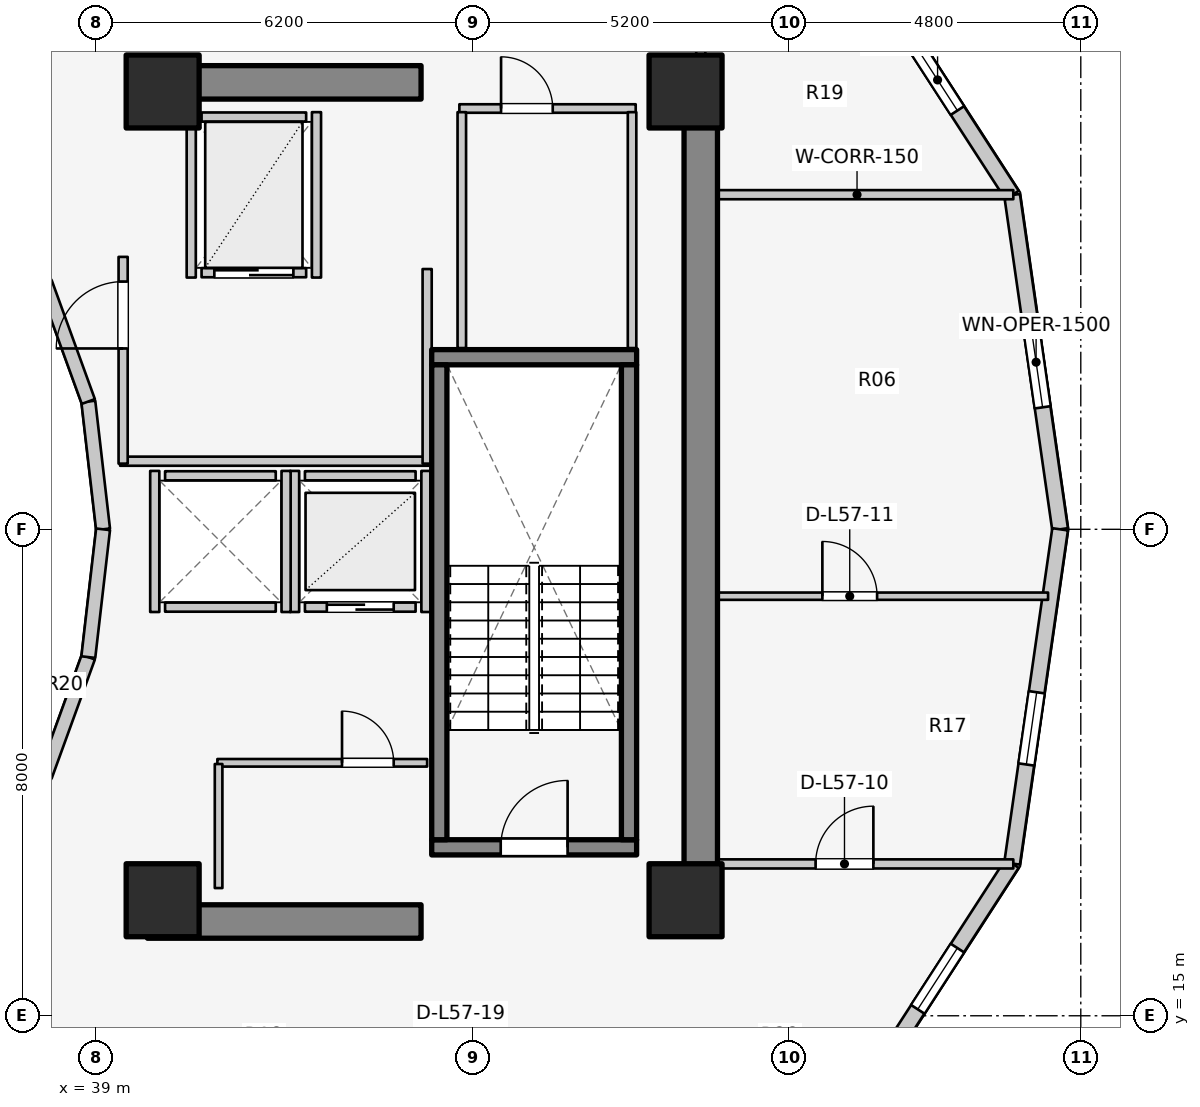
"""IFC4 building model, lengths in metres.
Left out: names, types, materials, properties, quantities, classifications, styles, units other than length and angle.
Written with IfcOpenShell. Run it as: python <this file> out.ifc"""

import sys

from ifc_helpers import new_model, si_unit, direction, frame, frame_2d, origin, origin_2d, place, context, subcontext, project, spatial, rectangle, extrude, element, fill, save


model = new_model("IFC4")
c1 = context("Model", 3, precision=1e-05, world=origin(), true_north=direction((0.0, 1.0)))
c2 = subcontext(c1, "Body", "Model", "MODEL_VIEW")
j1 = project(units=[si_unit("LENGTHUNIT", "METRE"), si_unit("PLANEANGLEUNIT", "RADIAN")], contexts=[c1])
p1 = place(None, origin())
s1 = spatial("IfcSite", under=j1, at=p1, CompositionType="ELEMENT")
p2 = place(p1, origin())
s2 = spatial("IfcBuilding", under=s1, at=p2, CompositionType="ELEMENT")
p3 = place(p2, frame((0.0, 0.0, 187.0)))
s3 = spatial("IfcBuildingStorey", under=s2, at=p3, CompositionType="ELEMENT", Elevation=187.0)
p4 = place(p3, frame((48.95, 17.05, 0.0), z_axis=(0.0, 0.0, 1.0), x_axis=(0.0, 1.0, 0.0)))
e1 = element("IfcWall", 1, at=p4, inside=s3, PredefinedType="SHEAR", context=c2, shape_type="SweptSolid", body=[
    extrude(rectangle(XDim=12.8, YDim=0.55, at=frame_2d((6.4, 0.0))), origin(), (0.0, 0.0, 1.0), 3.1),
])
for number, where, z_axis, x_axis in (
    (2, (39.85, 16.55, 0.0), (0.0, 0.0, 1.0), (1.0, 0.0, 0.0)),
    (3, (39.85, 30.35, 0.0), (0.0, 0.0, 1.0), (1.0, 0.0, 0.0)),
):
    element("IfcWall", number, at=place(p3, frame(where, z_axis=z_axis, x_axis=x_axis)), inside=s3, PredefinedType="SHEAR", context=c2, shape_type="SweptSolid", body=[
        extrude(rectangle(XDim=4.5, YDim=0.55, at=frame_2d((2.25, 0.0))), origin(), (0.0, 0.0, 1.0), 3.1),
    ])
p5 = place(p3, frame((44.525, 17.77, 0.0), z_axis=(0.0, 0.0, 1.0), x_axis=(1.0, 0.0, 0.0)))
e4 = element("IfcWall", 4, at=p5, inside=s3, PredefinedType="SOLIDWALL", context=c2, shape_type="SweptSolid", body=[
    extrude(rectangle(XDim=3.37, YDim=0.25, at=frame_2d((1.685, 0.0))), origin(), (0.0, 0.0, 1.0), 3.1),
])
p6 = place(p5, frame((1.135, 0.0, 0.0)))
e5 = element("IfcOpeningElement", 5, at=p6, cuts=e4, PredefinedType="OPENING", context=c2, shape_type="SweptSolid", body=[
    extrude(rectangle(XDim=1.1, YDim=2.1, at=frame_2d((0.55, 1.05))), frame((0.0, 0.135, 0.0), z_axis=(0.0, -1.0, 0.0), x_axis=(1.0, 0.0, 0.0)), (0.0, 0.0, 1.0), 0.27),
])
p7 = place(p3, frame((44.525, 25.83, 0.0), z_axis=(0.0, 0.0, 1.0), x_axis=(1.0, 0.0, 0.0)))
e6 = element("IfcWall", 6, at=p7, inside=s3, PredefinedType="SOLIDWALL", context=c2, shape_type="SweptSolid", body=[
    extrude(rectangle(XDim=3.37, YDim=0.25, at=frame_2d((1.685, 0.0))), origin(), (0.0, 0.0, 1.0), 3.1),
])
for number, where, z_axis, x_axis in (
    (7, (44.65, 17.895, 0.0), (0.0, 0.0, 1.0), (0.0, 1.0, 0.0)),
    (8, (47.77, 17.895, 0.0), (0.0, 0.0, 1.0), (0.0, 1.0, 0.0)),
):
    element("IfcWall", number, at=place(p3, frame(where, z_axis=z_axis, x_axis=x_axis)), inside=s3, PredefinedType="SOLIDWALL", context=c2, shape_type="SweptSolid", body=[
        extrude(rectangle(XDim=7.81, YDim=0.25, at=frame_2d((3.905, 0.0))), origin(), (0.0, 0.0, 1.0), 3.1),
    ])
for number, where, z_axis, x_axis in (
    (9, (40.1, 16.9, 0.0), (0.0, 0.0, 1.0), (1.0, 0.0, 0.0)),
    (10, (48.7, 16.9, 0.0), (0.0, 0.0, 1.0), (1.0, 0.0, 0.0)),
    (11, (48.7, 30.2, 0.0), (0.0, 0.0, 1.0), (1.0, 0.0, 0.0)),
    (12, (40.1, 30.2, 0.0), (0.0, 0.0, 1.0), (1.0, 0.0, 0.0)),
):
    element("IfcColumn", number, at=place(p3, frame(where, z_axis=z_axis, x_axis=x_axis)), inside=s3, PredefinedType="COLUMN", context=c2, shape_type="SweptSolid", body=[
        extrude(rectangle(XDim=1.2, YDim=1.2, at=origin_2d()), origin(), (0.0, 0.0, 1.0), 3.1),
    ])
p8 = place(p3, frame((39.12, 23.0, 0.0), z_axis=(0.0, 0.0, 1.0), x_axis=(-0.114711713601, 0.993398823617, 0.0)))
e13 = element("IfcWall", 13, at=p8, inside=s3, PredefinedType="STANDARD", context=c2, shape_type="SweptSolid", body=[
    extrude(rectangle(XDim=2.115, YDim=0.23, at=frame_2d((1.058, 0.0))), origin(), (0.0, 0.0, 1.0), 2.56),
])
for number, where, z_axis, x_axis in (
    (14, (38.877, 25.102, 0.0), (0.0, 0.0, 1.0), (-0.341, 0.94, 0.0)),
    (15, (38.166, 18.94, 0.0), (0.0, 0.0, 1.0), (0.341, 0.94, 0.0)),
):
    element("IfcWall", number, at=place(p3, frame(where, z_axis=z_axis, x_axis=x_axis)), inside=s3, PredefinedType="STANDARD", context=c2, shape_type="SweptSolid", body=[
        extrude(rectangle(XDim=2.084, YDim=0.23, at=frame_2d((1.042, 0.0))), origin(), (0.0, 0.0, 1.0), 2.56),
    ])
p9 = place(p3, frame((38.877, 20.898, 0.0), z_axis=(0.0, 0.0, 1.0), x_axis=(0.114711713601, 0.993398823617, 0.0)))
e16 = element("IfcWall", 16, at=p9, inside=s3, PredefinedType="STANDARD", context=c2, shape_type="SweptSolid", body=[
    extrude(rectangle(XDim=2.115, YDim=0.23, at=frame_2d((1.058, 0.0))), origin(), (0.0, 0.0, 1.0), 2.56),
])
p10 = place(p3, frame((54.86, 23.0, 0.0), z_axis=(0.0, 0.0, 1.0), x_axis=(-0.142227632286, 0.989833976288, 0.0)))
e17 = element("IfcWall", 17, at=p10, inside=s3, PredefinedType="STANDARD", context=c2, shape_type="SweptSolid", body=[
    extrude(rectangle(XDim=5.553, YDim=0.26, at=frame_2d((2.776, 0.0))), origin(), (0.0, 0.0, 1.0), 2.57),
])
p11 = place(p10, frame((2.027, 0.0, 0.75)))
e18 = element("IfcOpeningElement", 18, at=p11, cuts=e17, PredefinedType="OPENING", context=c2, shape_type="SweptSolid", body=[
    extrude(rectangle(XDim=1.5, YDim=1.6, at=frame_2d((0.75, 0.8))), frame((0.0, 0.14, 0.0), z_axis=(0.0, -1.0, 0.0), x_axis=(1.0, 0.0, 0.0)), (0.0, 0.0, 1.0), 0.28),
])
p12 = place(p3, frame((54.07, 28.497, 0.0), z_axis=(0.0, 0.0, 1.0), x_axis=(-0.543358984534, 0.839500454989, 0.0)))
e19 = element("IfcWall", 19, at=p12, inside=s3, PredefinedType="STANDARD", context=c2, shape_type="SweptSolid", body=[
    extrude(rectangle(XDim=4.511, YDim=0.26, at=frame_2d((2.256, 0.0))), origin(), (0.0, 0.0, 1.0), 1.22),
])
p13 = place(p12, frame((1.656, 0.0, 0.15)))
e20 = element("IfcOpeningElement", 20, at=p13, cuts=e19, PredefinedType="OPENING", context=c2, shape_type="SweptSolid", body=[
    extrude(rectangle(XDim=1.2, YDim=0.9, at=frame_2d((0.6, 0.45))), frame((0.0, 0.14, 0.0), z_axis=(0.0, -1.0, 0.0), x_axis=(1.0, 0.0, 0.0)), (0.0, 0.0, 1.0), 0.28),
])
p14 = place(p3, frame((51.619, 13.716, 0.0), z_axis=(0.0, 0.0, 1.0), x_axis=(0.543358984534, 0.839500454989, 0.0)))
e21 = element("IfcWall", 21, at=p14, inside=s3, PredefinedType="STANDARD", context=c2, shape_type="SweptSolid", body=[
    extrude(rectangle(XDim=4.511, YDim=0.26, at=frame_2d((2.256, 0.0))), origin(), (0.0, 0.0, 1.0), 1.22),
])
p15 = place(p14, frame((1.656, 0.0, 0.15)))
e22 = element("IfcOpeningElement", 22, at=p15, cuts=e21, PredefinedType="OPENING", context=c2, shape_type="SweptSolid", body=[
    extrude(rectangle(XDim=1.2, YDim=0.9, at=frame_2d((0.6, 0.45))), frame((0.0, 0.14, 0.0), z_axis=(0.0, -1.0, 0.0), x_axis=(1.0, 0.0, 0.0)), (0.0, 0.0, 1.0), 0.28),
])
p16 = place(p3, frame((54.07, 17.503, 0.0), z_axis=(0.0, 0.0, 1.0), x_axis=(0.142227632286, 0.989833976288, 0.0)))
e23 = element("IfcWall", 23, at=p16, inside=s3, PredefinedType="STANDARD", context=c2, shape_type="SweptSolid", body=[
    extrude(rectangle(XDim=5.553, YDim=0.26, at=frame_2d((2.776, 0.0))), origin(), (0.0, 0.0, 1.0), 2.57),
])
p17 = place(p16, frame((1.646, 0.0, 0.75)))
e24 = element("IfcOpeningElement", 24, at=p17, cuts=e23, PredefinedType="OPENING", context=c2, shape_type="SweptSolid", body=[
    extrude(rectangle(XDim=1.2, YDim=1.5, at=frame_2d((0.6, 0.75))), frame((0.0, 0.14, 0.0), z_axis=(0.0, -1.0, 0.0), x_axis=(1.0, 0.0, 0.0)), (0.0, 0.0, 1.0), 0.28),
])
p18 = place(p3, frame((42.44, 21.72, 0.0), z_axis=(0.0, 0.0, 1.0), x_axis=(1.0, 0.0, 0.0)))
e25 = element("IfcWall", 25, at=p18, inside=s3, PredefinedType="SOLIDWALL", context=c2, shape_type="SweptSolid", body=[
    extrude(rectangle(XDim=1.82, YDim=0.15, at=frame_2d((0.91, 0.0))), origin(), (0.0, 0.0, 1.0), 2.575),
])
p19 = place(p18, frame((0.36, 0.0, 0.0)))
e26 = element("IfcOpeningElement", 26, at=p19, cuts=e25, PredefinedType="OPENING", context=c2, shape_type="SweptSolid", body=[
    extrude(rectangle(XDim=1.1, YDim=2.1, at=frame_2d((0.55, 1.05))), frame((0.0, 0.085, 0.0), z_axis=(0.0, -1.0, 0.0), x_axis=(1.0, 0.0, 0.0)), (0.0, 0.0, 1.0), 0.17),
])
p20 = place(p3, frame((42.44, 23.88, 0.0), z_axis=(0.0, 0.0, 1.0), x_axis=(1.0, 0.0, 0.0)))
e27 = element("IfcWall", 27, at=p20, inside=s3, PredefinedType="SOLIDWALL", context=c2, shape_type="SweptSolid", body=[
    extrude(rectangle(XDim=1.82, YDim=0.15, at=frame_2d((0.91, 0.0))), origin(), (0.0, 0.0, 1.0), 2.575),
])
for number, where, z_axis, x_axis in (
    (28, (42.27, 21.64, 0.0), (0.0, 0.0, 1.0), (0.0, 1.0, 0.0)),
    (29, (44.43, 21.64, 0.0), (0.0, 0.0, 1.0), (0.0, 1.0, 0.0)),
):
    element("IfcWall", number, at=place(p3, frame(where, z_axis=z_axis, x_axis=x_axis)), inside=s3, PredefinedType="SOLIDWALL", context=c2, shape_type="SweptSolid", body=[
        extrude(rectangle(XDim=2.32, YDim=0.15, at=frame_2d((1.16, 0.0))), origin(), (0.0, 0.0, 1.0), 2.575),
    ])
for number, where, z_axis, x_axis in (
    (30, (40.14, 21.72, 0.0), (0.0, 0.0, 1.0), (1.0, 0.0, 0.0)),
    (31, (40.14, 23.88, 0.0), (0.0, 0.0, 1.0), (1.0, 0.0, 0.0)),
):
    element("IfcWall", number, at=place(p3, frame(where, z_axis=z_axis, x_axis=x_axis)), inside=s3, PredefinedType="SOLIDWALL", context=c2, shape_type="SweptSolid", body=[
        extrude(rectangle(XDim=1.82, YDim=0.15, at=frame_2d((0.91, 0.0))), origin(), (0.0, 0.0, 1.0), 2.12),
    ])
p21 = place(p3, frame((39.97, 21.64, 0.0), z_axis=(0.0, 0.0, 1.0), x_axis=(0.0, 1.0, 0.0)))
e32 = element("IfcWall", 32, at=p21, inside=s3, PredefinedType="SOLIDWALL", context=c2, shape_type="SweptSolid", body=[
    extrude(rectangle(XDim=2.32, YDim=0.15, at=frame_2d((1.16, 0.0))), origin(), (0.0, 0.0, 1.0), 2.12),
])
p22 = place(p3, frame((42.13, 21.64, 0.0), z_axis=(0.0, 0.0, 1.0), x_axis=(0.0, 1.0, 0.0)))
e33 = element("IfcWall", 33, at=p22, inside=s3, PredefinedType="SOLIDWALL", context=c2, shape_type="SweptSolid", body=[
    extrude(rectangle(XDim=2.32, YDim=0.15, at=frame_2d((1.16, 0.0))), origin(), (0.0, 0.0, 1.0), 2.575),
])
p23 = place(p3, frame((40.74, 27.22, 0.0), z_axis=(0.0, 0.0, 1.0), x_axis=(1.0, 0.0, 0.0)))
e34 = element("IfcWall", 34, at=p23, inside=s3, PredefinedType="SOLIDWALL", context=c2, shape_type="SweptSolid", body=[
    extrude(rectangle(XDim=1.72, YDim=0.15, at=frame_2d((0.86, 0.0))), origin(), (0.0, 0.0, 1.0), 2.575),
])
p24 = place(p23, frame((0.21, 0.0, 0.0)))
e35 = element("IfcOpeningElement", 35, at=p24, cuts=e34, PredefinedType="OPENING", context=c2, shape_type="SweptSolid", body=[
    extrude(rectangle(XDim=1.3, YDim=2.1, at=frame_2d((0.65, 1.05))), frame((0.0, 0.085, 0.0), z_axis=(0.0, -1.0, 0.0), x_axis=(1.0, 0.0, 0.0)), (0.0, 0.0, 1.0), 0.17),
])
p25 = place(p3, frame((40.74, 29.78, 0.0), z_axis=(0.0, 0.0, 1.0), x_axis=(1.0, 0.0, 0.0)))
e36 = element("IfcWall", 36, at=p25, inside=s3, PredefinedType="SOLIDWALL", context=c2, shape_type="SweptSolid", body=[
    extrude(rectangle(XDim=1.72, YDim=0.15, at=frame_2d((0.86, 0.0))), origin(), (0.0, 0.0, 1.0), 2.575),
])
for number, where, z_axis, x_axis in (
    (37, (40.57, 27.14, 0.0), (0.0, 0.0, 1.0), (0.0, 1.0, 0.0)),
    (38, (42.63, 27.14, 0.0), (0.0, 0.0, 1.0), (0.0, 1.0, 0.0)),
):
    element("IfcWall", number, at=place(p3, frame(where, z_axis=z_axis, x_axis=x_axis)), inside=s3, PredefinedType="SOLIDWALL", context=c2, shape_type="SweptSolid", body=[
        extrude(rectangle(XDim=2.72, YDim=0.15, at=frame_2d((1.36, 0.0))), origin(), (0.0, 0.0, 1.0), 2.575),
    ])
p26 = place(p3, frame((39.4, 24.12, 0.0), z_axis=(0.0, 0.0, 1.0), x_axis=(1.0, 0.0, 0.0)))
e39 = element("IfcWall", 39, at=p26, inside=s3, PredefinedType="PARTITIONING", context=c2, shape_type="SweptSolid", body=[
    extrude(rectangle(XDim=5.08, YDim=0.15, at=frame_2d((2.54, 0.0))), origin(), (0.0, 0.0, 1.0), 2.12),
])
p27 = place(p3, frame((44.45, 24.08, 0.0), z_axis=(0.0, 0.0, 1.0), x_axis=(0.0, 1.0, 0.0)))
e40 = element("IfcWall", 40, at=p27, inside=s3, PredefinedType="PARTITIONING", context=c2, shape_type="SweptSolid", body=[
    extrude(rectangle(XDim=3.2, YDim=0.15, at=frame_2d((1.6, 0.0))), origin(), (0.0, 0.0, 1.0), 2.575),
])
p28 = place(p3, frame((39.45, 24.08, 0.0), z_axis=(0.0, 0.0, 1.0), x_axis=(0.0, 1.0, 0.0)))
e41 = element("IfcWall", 41, at=p28, inside=s3, PredefinedType="PARTITIONING", context=c2, shape_type="SweptSolid", body=[
    extrude(rectangle(XDim=3.4, YDim=0.15, at=frame_2d((1.7, 0.0))), origin(), (0.0, 0.0, 1.0), 2.575),
])
p29 = place(p28, frame((1.894, 0.0, 0.0)))
e42 = element("IfcOpeningElement", 42, at=p29, cuts=e41, PredefinedType="OPENING", context=c2, shape_type="SweptSolid", body=[
    extrude(rectangle(XDim=1.1, YDim=2.1, at=frame_2d((0.55, 1.05))), frame((0.0, 0.085, 0.0), z_axis=(0.0, -1.0, 0.0), x_axis=(1.0, 0.0, 0.0)), (0.0, 0.0, 1.0), 0.17),
])
p30 = place(p3, frame((41.0, 19.16, 0.0), z_axis=(0.0, 0.0, 1.0), x_axis=(1.0, 0.0, 0.0)))
e43 = element("IfcWall", 43, at=p30, inside=s3, PredefinedType="PARTITIONING", context=c2, shape_type="SweptSolid", body=[
    extrude(rectangle(XDim=3.45, YDim=0.125, at=frame_2d((1.725, 0.0))), origin(), (0.0, 0.0, 1.0), 2.12),
])
p31 = place(p30, frame((2.05, 0.0, 0.0)))
e44 = element("IfcOpeningElement", 44, at=p31, cuts=e43, PredefinedType="OPENING", context=c2, shape_type="SweptSolid", body=[
    extrude(rectangle(XDim=0.85, YDim=2.05, at=frame_2d((0.425, 1.025))), frame((0.0, 0.073, 0.0), z_axis=(0.0, -1.0, 0.0), x_axis=(1.0, 0.0, 0.0)), (0.0, 0.0, 1.0), 0.145),
])
p32 = place(p3, frame((41.02, 17.1, 0.0), z_axis=(0.0, 0.0, 1.0), x_axis=(0.0, 1.0, 0.0)))
e45 = element("IfcWall", 45, at=p32, inside=s3, PredefinedType="PARTITIONING", context=c2, shape_type="SweptSolid", body=[
    extrude(rectangle(XDim=2.04, YDim=0.125, at=frame_2d((1.02, 0.0))), origin(), (0.0, 0.0, 1.0), 2.575),
])
p33 = place(p3, frame((44.98, 29.92, 0.0), z_axis=(0.0, 0.0, 1.0), x_axis=(1.0, 0.0, 0.0)))
e46 = element("IfcWall", 46, at=p33, inside=s3, PredefinedType="PLUMBINGWALL", context=c2, shape_type="SweptSolid", body=[
    extrude(rectangle(XDim=2.9, YDim=0.14, at=frame_2d((1.45, 0.0))), origin(), (0.0, 0.0, 1.0), 2.575),
])
p34 = place(p33, frame((0.686, 0.0, 0.0)))
e47 = element("IfcOpeningElement", 47, at=p34, cuts=e46, PredefinedType="OPENING", context=c2, shape_type="SweptSolid", body=[
    extrude(rectangle(XDim=0.85, YDim=2.05, at=frame_2d((0.425, 1.025))), frame((0.0, 0.08, 0.0), z_axis=(0.0, -1.0, 0.0), x_axis=(1.0, 0.0, 0.0)), (0.0, 0.0, 1.0), 0.16),
])
for number, where, z_axis, x_axis in (
    (48, (45.02, 25.98, 0.0), (0.0, 0.0, 1.0), (0.0, 1.0, 0.0)),
    (49, (47.82, 25.98, 0.0), (0.0, 0.0, 1.0), (0.0, 1.0, 0.0)),
):
    element("IfcWall", number, at=place(p3, frame(where, z_axis=z_axis, x_axis=x_axis)), inside=s3, PredefinedType="PLUMBINGWALL", context=c2, shape_type="SweptSolid", body=[
        extrude(rectangle(XDim=3.88, YDim=0.14, at=frame_2d((1.94, 0.0))), origin(), (0.0, 0.0, 1.0), 2.575),
    ])
p35 = place(p3, frame((48.95, 17.497, 0.0), z_axis=(0.0, 0.0, 1.0), x_axis=(1.0, 0.0, 0.0)))
e50 = element("IfcWall", 50, at=p35, inside=s3, PredefinedType="PARTITIONING", context=c2, shape_type="SweptSolid", body=[
    extrude(rectangle(XDim=5.14, YDim=0.15, at=frame_2d((2.57, 0.0))), origin(), (0.0, 0.0, 1.0), 2.575),
])
p36 = place(p35, frame((1.889, 0.0, 0.0)))
e51 = element("IfcOpeningElement", 51, at=p36, cuts=e50, PredefinedType="OPENING", context=c2, shape_type="SweptSolid", body=[
    extrude(rectangle(XDim=0.95, YDim=2.1, at=frame_2d((0.475, 1.05))), frame((0.0, 0.085, 0.0), z_axis=(0.0, -1.0, 0.0), x_axis=(1.0, 0.0, 0.0)), (0.0, 0.0, 1.0), 0.17),
])
p37 = place(p3, frame((48.95, 28.503, 0.0), z_axis=(0.0, 0.0, 1.0), x_axis=(1.0, 0.0, 0.0)))
e52 = element("IfcWall", 52, at=p37, inside=s3, PredefinedType="PARTITIONING", context=c2, shape_type="SweptSolid", body=[
    extrude(rectangle(XDim=5.14, YDim=0.15, at=frame_2d((2.57, 0.0))), origin(), (0.0, 0.0, 1.0), 2.575),
])
p38 = place(p3, frame((48.95, 21.9, 0.0), z_axis=(0.0, 0.0, 1.0), x_axis=(1.0, 0.0, 0.0)))
e53 = element("IfcWall", 53, at=p38, inside=s3, PredefinedType="MOVABLE", context=c2, shape_type="SweptSolid", body=[
    extrude(rectangle(XDim=5.712, YDim=0.12, at=frame_2d((2.856, 0.0))), origin(), (0.0, 0.0, 1.0), 2.575),
])
p39 = place(p38, frame((2.0, 0.0, 0.0)))
e54 = element("IfcOpeningElement", 54, at=p39, cuts=e53, PredefinedType="OPENING", context=c2, shape_type="SweptSolid", body=[
    extrude(rectangle(XDim=0.9, YDim=2.1, at=frame_2d((0.45, 1.05))), frame((0.0, 0.07, 0.0), z_axis=(0.0, -1.0, 0.0), x_axis=(1.0, 0.0, 0.0)), (0.0, 0.0, 1.0), 0.14),
])
p40 = place(p3, frame((48.95, 29.8, 0.0), z_axis=(0.0, 0.0, 1.0), x_axis=(0.0, 1.0, 0.0)))
e55 = element("IfcWall", 55, at=p40, inside=s3, PredefinedType="PARTITIONING", context=c2, shape_type="SweptSolid", body=[
    extrude(rectangle(XDim=1.29, YDim=0.15, at=frame_2d((0.645, 0.0))), origin(), (0.0, 0.0, 1.0), 1.22),
])
p41 = place(p11, origin())
e56 = element("IfcWindow", 56, at=p41, inside=s3, PartitioningType="SINGLE_PANEL", PredefinedType="WINDOW", context=c2, shape_type="SweptSolid", body=[
    extrude(rectangle(XDim=1.5, YDim=1.6, at=frame_2d((0.75, 0.8))), frame((0.0, 0.03, 0.0), z_axis=(0.0, -1.0, 0.0), x_axis=(1.0, 0.0, 0.0)), (0.0, 0.0, 1.0), 0.06),
])
fill(e18, e56)
p42 = place(p13, origin())
e57 = element("IfcWindow", 57, at=p42, inside=s3, PartitioningType="SINGLE_PANEL", PredefinedType="WINDOW", context=c2, shape_type="SweptSolid", body=[
    extrude(rectangle(XDim=1.2, YDim=0.9, at=frame_2d((0.6, 0.45))), frame((0.0, 0.03, 0.0), z_axis=(0.0, -1.0, 0.0), x_axis=(1.0, 0.0, 0.0)), (0.0, 0.0, 1.0), 0.06),
])
fill(e20, e57)
p43 = place(p15, origin())
e58 = element("IfcWindow", 58, at=p43, inside=s3, PartitioningType="SINGLE_PANEL", PredefinedType="WINDOW", context=c2, shape_type="SweptSolid", body=[
    extrude(rectangle(XDim=1.2, YDim=0.9, at=frame_2d((0.6, 0.45))), frame((0.0, 0.03, 0.0), z_axis=(0.0, -1.0, 0.0), x_axis=(1.0, 0.0, 0.0)), (0.0, 0.0, 1.0), 0.06),
])
fill(e22, e58)
p44 = place(p17, origin())
e59 = element("IfcWindow", 59, at=p44, inside=s3, PartitioningType="SINGLE_PANEL", PredefinedType="WINDOW", context=c2, shape_type="SweptSolid", body=[
    extrude(rectangle(XDim=1.2, YDim=1.5, at=frame_2d((0.6, 0.75))), frame((0.0, 0.03, 0.0), z_axis=(0.0, -1.0, 0.0), x_axis=(1.0, 0.0, 0.0)), (0.0, 0.0, 1.0), 0.06),
])
fill(e24, e59)
p45 = place(p6, origin())
e60 = element("IfcDoor", 60, at=p45, inside=s3, OperationType="SINGLE_SWING_RIGHT", PredefinedType="DOOR", context=c2, shape_type="SweptSolid", body=[
    extrude(rectangle(XDim=1.1, YDim=2.1, at=frame_2d((0.55, 1.05))), frame((0.0, 0.025, 0.0), z_axis=(0.0, -1.0, 0.0), x_axis=(1.0, 0.0, 0.0)), (0.0, 0.0, 1.0), 0.05),
])
fill(e5, e60)
p46 = place(p19, origin())
e61 = element("IfcDoor", 61, at=p46, inside=s3, OperationType="DOUBLE_DOOR_SLIDING", PredefinedType="DOOR", context=c2, shape_type="SweptSolid", body=[
    extrude(rectangle(XDim=1.1, YDim=2.1, at=frame_2d((0.55, 1.05))), frame((0.0, 0.025, 0.0), z_axis=(0.0, -1.0, 0.0), x_axis=(1.0, 0.0, 0.0)), (0.0, 0.0, 1.0), 0.05),
])
fill(e26, e61)
p47 = place(p24, origin())
e62 = element("IfcDoor", 62, at=p47, inside=s3, OperationType="DOUBLE_DOOR_SLIDING", PredefinedType="DOOR", context=c2, shape_type="SweptSolid", body=[
    extrude(rectangle(XDim=1.3, YDim=2.1, at=frame_2d((0.65, 1.05))), frame((0.0, 0.025, 0.0), z_axis=(0.0, -1.0, 0.0), x_axis=(1.0, 0.0, 0.0)), (0.0, 0.0, 1.0), 0.05),
])
fill(e35, e62)
p48 = place(p29, origin())
e63 = element("IfcDoor", 63, at=p48, inside=s3, OperationType="SINGLE_SWING_LEFT", PredefinedType="DOOR", context=c2, shape_type="SweptSolid", body=[
    extrude(rectangle(XDim=1.1, YDim=2.1, at=frame_2d((0.55, 1.05))), frame((0.0, 0.025, 0.0), z_axis=(0.0, -1.0, 0.0), x_axis=(1.0, 0.0, 0.0)), (0.0, 0.0, 1.0), 0.05),
])
fill(e42, e63)
p49 = place(p31, origin())
e64 = element("IfcDoor", 64, at=p49, inside=s3, OperationType="SINGLE_SWING_LEFT", PredefinedType="DOOR", context=c2, shape_type="SweptSolid", body=[
    extrude(rectangle(XDim=0.85, YDim=2.05, at=frame_2d((0.425, 1.025))), frame((0.0, 0.025, 0.0), z_axis=(0.0, -1.0, 0.0), x_axis=(1.0, 0.0, 0.0)), (0.0, 0.0, 1.0), 0.05),
])
fill(e44, e64)
p50 = place(p34, origin())
e65 = element("IfcDoor", 65, at=p50, inside=s3, OperationType="SINGLE_SWING_LEFT", PredefinedType="DOOR", context=c2, shape_type="SweptSolid", body=[
    extrude(rectangle(XDim=0.85, YDim=2.05, at=frame_2d((0.425, 1.025))), frame((0.0, 0.025, 0.0), z_axis=(0.0, -1.0, 0.0), x_axis=(1.0, 0.0, 0.0)), (0.0, 0.0, 1.0), 0.05),
])
fill(e47, e65)
p51 = place(p36, origin())
e66 = element("IfcDoor", 66, at=p51, inside=s3, OperationType="SINGLE_SWING_RIGHT", PredefinedType="DOOR", context=c2, shape_type="SweptSolid", body=[
    extrude(rectangle(XDim=0.95, YDim=2.1, at=frame_2d((0.475, 1.05))), frame((0.0, 0.025, 0.0), z_axis=(0.0, -1.0, 0.0), x_axis=(1.0, 0.0, 0.0)), (0.0, 0.0, 1.0), 0.05),
])
fill(e51, e66)
p52 = place(p39, origin())
e67 = element("IfcDoor", 67, at=p52, inside=s3, OperationType="SINGLE_SWING_LEFT", PredefinedType="DOOR", context=c2, shape_type="SweptSolid", body=[
    extrude(rectangle(XDim=0.9, YDim=2.1, at=frame_2d((0.45, 1.05))), frame((0.0, 0.025, 0.0), z_axis=(0.0, -1.0, 0.0), x_axis=(1.0, 0.0, 0.0)), (0.0, 0.0, 1.0), 0.05),
])
fill(e54, e67)
save(model, sys.argv[1])
